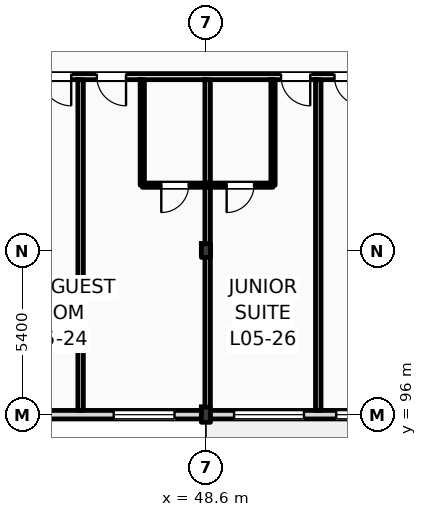
"""IFC4 building model, lengths in metres.
Left out: names, types, materials, properties, quantities, classifications, styles, units other than length and angle.
Written with IfcOpenShell. Run it as: python <this file> out.ifc"""

import sys

from ifc_helpers import new_model, si_unit, direction, frame, frame_2d, origin, origin_2d, place, context, subcontext, project, spatial, rectangle, i_section, extrude, element, fill, save


model = new_model("IFC4")
c1 = context("Model", 3, precision=1e-05, world=origin(), true_north=direction((0.0, 1.0)))
c2 = subcontext(c1, "Body", "Model", "MODEL_VIEW")
j1 = project(units=[si_unit("LENGTHUNIT", "METRE"), si_unit("PLANEANGLEUNIT", "RADIAN")], contexts=[c1])
p1 = place(None, origin())
s1 = spatial("IfcSite", under=j1, at=p1, CompositionType="ELEMENT")
p2 = place(p1, origin())
s2 = spatial("IfcBuilding", under=s1, at=p2, CompositionType="ELEMENT")
p3 = place(p2, frame((0.0, 0.0, 24.6)))
s3 = spatial("IfcBuildingStorey", under=s2, at=p3, CompositionType="ELEMENT", Elevation=24.6)
p4 = place(p3, frame((48.6, 96.0, 0.0), z_axis=(0.0, 0.0, 1.0), x_axis=(1.0, 0.0, 0.0)))
e1 = element("IfcColumn", 1, at=p4, inside=s3, PredefinedType="COLUMN", context=c2, shape_type="SweptSolid", body=[
    extrude(i_section(OverallWidth=0.3, OverallDepth=0.5, WebThickness=0.014, FlangeThickness=0.028, FilletRadius=0.027, at=origin_2d()), origin(), (0.0, 0.0, 1.0), 3.6),
])
p5 = place(p3, frame((48.6, 101.4, 0.0), z_axis=(0.0, 0.0, 1.0), x_axis=(1.0, 0.0, 0.0)))
e2 = element("IfcColumn", 2, at=p5, inside=s3, PredefinedType="COLUMN", context=c2, shape_type="SweptSolid", body=[
    extrude(i_section(OverallWidth=0.3, OverallDepth=0.45, WebThickness=0.014, FlangeThickness=0.026, FilletRadius=0.027, at=origin_2d()), origin(), (0.0, 0.0, 1.0), 3.6),
])
p6 = place(p3, frame((25.2, 96.0, 0.0), z_axis=(0.0, 0.0, 1.0), x_axis=(1.0, 0.0, 0.0)))
e3 = element("IfcWall", 3, at=p6, inside=s3, PredefinedType="STANDARD", context=c2, shape_type="SweptSolid", body=[
    extrude(rectangle(XDim=94.8, YDim=0.28, at=frame_2d((47.4, 0.0))), origin(), (0.0, 0.0, 1.0), 2.78),
])
p7 = place(p6, frame((16.539, 0.0, 0.9)))
e4 = element("IfcOpeningElement", 4, at=p7, cuts=e3, PredefinedType="OPENING", context=c2, shape_type="SweptSolid", body=[
    extrude(rectangle(XDim=1.75, YDim=1.7, at=frame_2d((0.875, 0.85))), frame((0.0, 0.15, 0.0), z_axis=(0.0, -1.0, 0.0), x_axis=(1.0, 0.0, 0.0)), (0.0, 0.0, 1.0), 0.3),
])
p8 = place(p6, frame((20.367, 0.0, 0.9)))
e5 = element("IfcOpeningElement", 5, at=p8, cuts=e3, PredefinedType="OPENING", context=c2, shape_type="SweptSolid", body=[
    extrude(rectangle(XDim=2.0, YDim=1.7, at=frame_2d((1.0, 0.85))), frame((0.0, 0.15, 0.0), z_axis=(0.0, -1.0, 0.0), x_axis=(1.0, 0.0, 0.0)), (0.0, 0.0, 1.0), 0.3),
])
p9 = place(p6, frame((24.326, 0.0, 0.9)))
e6 = element("IfcOpeningElement", 6, at=p9, cuts=e3, PredefinedType="OPENING", context=c2, shape_type="SweptSolid", body=[
    extrude(rectangle(XDim=2.3, YDim=1.7, at=frame_2d((1.15, 0.85))), frame((0.0, 0.15, 0.0), z_axis=(0.0, -1.0, 0.0), x_axis=(1.0, 0.0, 0.0)), (0.0, 0.0, 1.0), 0.3),
])
p10 = place(p6, frame((27.684, 0.0, 0.9)))
e7 = element("IfcOpeningElement", 7, at=p10, cuts=e3, PredefinedType="OPENING", context=c2, shape_type="SweptSolid", body=[
    extrude(rectangle(XDim=2.6, YDim=1.7, at=frame_2d((1.3, 0.85))), frame((0.0, 0.15, 0.0), z_axis=(0.0, -1.0, 0.0), x_axis=(1.0, 0.0, 0.0)), (0.0, 0.0, 1.0), 0.3),
])
p11 = place(p6, frame((32.083, 0.0, 0.9)))
e8 = element("IfcOpeningElement", 8, at=p11, cuts=e3, PredefinedType="OPENING", context=c2, shape_type="SweptSolid", body=[
    extrude(rectangle(XDim=2.419, YDim=1.7, at=frame_2d((1.209, 0.85))), frame((0.0, 0.15, 0.0), z_axis=(0.0, -1.0, 0.0), x_axis=(1.0, 0.0, 0.0)), (0.0, 0.0, 1.0), 0.3),
])
p12 = place(p6, frame((35.322, 0.0, 0.9)))
e9 = element("IfcOpeningElement", 9, at=p12, cuts=e3, PredefinedType="OPENING", context=c2, shape_type="SweptSolid", body=[
    extrude(rectangle(XDim=2.868, YDim=1.7, at=frame_2d((1.434, 0.85))), frame((0.0, 0.15, 0.0), z_axis=(0.0, -1.0, 0.0), x_axis=(1.0, 0.0, 0.0)), (0.0, 0.0, 1.0), 0.3),
])
p13 = place(p6, frame((56.015, 0.0, 0.9)))
e10 = element("IfcOpeningElement", 10, at=p13, cuts=e3, PredefinedType="OPENING", context=c2, shape_type="SweptSolid", body=[
    extrude(rectangle(XDim=1.2, YDim=1.7, at=frame_2d((0.6, 0.85))), frame((0.0, 0.15, 0.0), z_axis=(0.0, -1.0, 0.0), x_axis=(1.0, 0.0, 0.0)), (0.0, 0.0, 1.0), 0.3),
])
p14 = place(p6, frame((59.888, 0.0, 0.9)))
e11 = element("IfcOpeningElement", 11, at=p14, cuts=e3, PredefinedType="OPENING", context=c2, shape_type="SweptSolid", body=[
    extrude(rectangle(XDim=1.35, YDim=1.7, at=frame_2d((0.675, 0.85))), frame((0.0, 0.15, 0.0), z_axis=(0.0, -1.0, 0.0), x_axis=(1.0, 0.0, 0.0)), (0.0, 0.0, 1.0), 0.3),
])
p15 = place(p6, frame((63.799, 0.0, 0.9)))
e12 = element("IfcOpeningElement", 12, at=p15, cuts=e3, PredefinedType="OPENING", context=c2, shape_type="SweptSolid", body=[
    extrude(rectangle(XDim=1.5, YDim=1.7, at=frame_2d((0.75, 0.85))), frame((0.0, 0.15, 0.0), z_axis=(0.0, -1.0, 0.0), x_axis=(1.0, 0.0, 0.0)), (0.0, 0.0, 1.0), 0.3),
])
p16 = place(p6, frame((67.709, 0.0, 0.9)))
e13 = element("IfcOpeningElement", 13, at=p16, cuts=e3, PredefinedType="OPENING", context=c2, shape_type="SweptSolid", body=[
    extrude(rectangle(XDim=1.65, YDim=1.7, at=frame_2d((0.825, 0.85))), frame((0.0, 0.15, 0.0), z_axis=(0.0, -1.0, 0.0), x_axis=(1.0, 0.0, 0.0)), (0.0, 0.0, 1.0), 0.3),
])
p17 = place(p6, frame((71.618, 0.0, 0.9)))
e14 = element("IfcOpeningElement", 14, at=p17, cuts=e3, PredefinedType="OPENING", context=c2, shape_type="SweptSolid", body=[
    extrude(rectangle(XDim=1.8, YDim=1.7, at=frame_2d((0.9, 0.85))), frame((0.0, 0.15, 0.0), z_axis=(0.0, -1.0, 0.0), x_axis=(1.0, 0.0, 0.0)), (0.0, 0.0, 1.0), 0.3),
])
p18 = place(p6, frame((75.129, 0.0, 0.9)))
e15 = element("IfcOpeningElement", 15, at=p18, cuts=e3, PredefinedType="OPENING", context=c2, shape_type="SweptSolid", body=[
    extrude(rectangle(XDim=1.95, YDim=1.7, at=frame_2d((0.975, 0.85))), frame((0.0, 0.15, 0.0), z_axis=(0.0, -1.0, 0.0), x_axis=(1.0, 0.0, 0.0)), (0.0, 0.0, 1.0), 0.3),
])
p19 = place(p6, frame((79.439, 0.0, 0.9)))
e16 = element("IfcOpeningElement", 16, at=p19, cuts=e3, PredefinedType="OPENING", context=c2, shape_type="SweptSolid", body=[
    extrude(rectangle(XDim=2.1, YDim=1.7, at=frame_2d((1.05, 0.85))), frame((0.0, 0.15, 0.0), z_axis=(0.0, -1.0, 0.0), x_axis=(1.0, 0.0, 0.0)), (0.0, 0.0, 1.0), 0.3),
])
p20 = place(p6, frame((83.349, 0.0, 0.9)))
e17 = element("IfcOpeningElement", 17, at=p20, cuts=e3, PredefinedType="OPENING", context=c2, shape_type="SweptSolid", body=[
    extrude(rectangle(XDim=2.25, YDim=1.7, at=frame_2d((1.125, 0.85))), frame((0.0, 0.15, 0.0), z_axis=(0.0, -1.0, 0.0), x_axis=(1.0, 0.0, 0.0)), (0.0, 0.0, 1.0), 0.3),
])
p21 = place(p6, frame((87.258, 0.0, 0.9)))
e18 = element("IfcOpeningElement", 18, at=p21, cuts=e3, PredefinedType="OPENING", context=c2, shape_type="SweptSolid", body=[
    extrude(rectangle(XDim=2.4, YDim=1.7, at=frame_2d((1.2, 0.85))), frame((0.0, 0.15, 0.0), z_axis=(0.0, -1.0, 0.0), x_axis=(1.0, 0.0, 0.0)), (0.0, 0.0, 1.0), 0.3),
])
p22 = place(p6, frame((91.204, 0.0, 0.9)))
e19 = element("IfcOpeningElement", 19, at=p22, cuts=e3, PredefinedType="OPENING", context=c2, shape_type="SweptSolid", body=[
    extrude(rectangle(XDim=2.55, YDim=1.7, at=frame_2d((1.275, 0.85))), frame((0.0, 0.15, 0.0), z_axis=(0.0, -1.0, 0.0), x_axis=(1.0, 0.0, 0.0)), (0.0, 0.0, 1.0), 0.3),
])
p23 = place(p3, frame((40.76, 107.12, 0.0), z_axis=(0.0, 0.0, 1.0), x_axis=(1.0, 0.0, 0.0)))
e20 = element("IfcWall", 20, at=p23, inside=s3, PredefinedType="PARTITIONING", context=c2, shape_type="SweptSolid", body=[
    extrude(rectangle(XDim=23.44, YDim=0.2, at=frame_2d((11.72, 0.0))), origin(), (0.0, 0.0, 1.0), 3.34),
])
p24 = place(p23, frame((2.449, 0.0, 0.0)))
e21 = element("IfcOpeningElement", 21, at=p24, cuts=e20, PredefinedType="OPENING", context=c2, shape_type="SweptSolid", body=[
    extrude(rectangle(XDim=0.96, YDim=2.2, at=frame_2d((0.48, 1.1))), frame((0.0, 0.11, 0.0), z_axis=(0.0, -1.0, 0.0), x_axis=(1.0, 0.0, 0.0)), (0.0, 0.0, 1.0), 0.22),
])
p25 = place(p23, frame((4.253, 0.0, 0.0)))
e22 = element("IfcOpeningElement", 22, at=p25, cuts=e20, PredefinedType="OPENING", context=c2, shape_type="SweptSolid", body=[
    extrude(rectangle(XDim=0.96, YDim=2.2, at=frame_2d((0.48, 1.1))), frame((0.0, 0.11, 0.0), z_axis=(0.0, -1.0, 0.0), x_axis=(1.0, 0.0, 0.0)), (0.0, 0.0, 1.0), 0.22),
])
p26 = place(p23, frame((10.311, 0.0, 0.0)))
e23 = element("IfcOpeningElement", 23, at=p26, cuts=e20, PredefinedType="OPENING", context=c2, shape_type="SweptSolid", body=[
    extrude(rectangle(XDim=0.96, YDim=2.2, at=frame_2d((0.48, 1.1))), frame((0.0, 0.11, 0.0), z_axis=(0.0, -1.0, 0.0), x_axis=(1.0, 0.0, 0.0)), (0.0, 0.0, 1.0), 0.22),
])
p27 = place(p23, frame((12.069, 0.0, 0.0)))
e24 = element("IfcOpeningElement", 24, at=p27, cuts=e20, PredefinedType="OPENING", context=c2, shape_type="SweptSolid", body=[
    extrude(rectangle(XDim=0.96, YDim=2.2, at=frame_2d((0.48, 1.1))), frame((0.0, 0.11, 0.0), z_axis=(0.0, -1.0, 0.0), x_axis=(1.0, 0.0, 0.0)), (0.0, 0.0, 1.0), 0.22),
])
p28 = place(p23, frame((18.128, 0.0, 0.0)))
e25 = element("IfcOpeningElement", 25, at=p28, cuts=e20, PredefinedType="OPENING", context=c2, shape_type="SweptSolid", body=[
    extrude(rectangle(XDim=0.96, YDim=2.2, at=frame_2d((0.48, 1.1))), frame((0.0, 0.11, 0.0), z_axis=(0.0, -1.0, 0.0), x_axis=(1.0, 0.0, 0.0)), (0.0, 0.0, 1.0), 0.22),
])
p29 = place(p23, frame((19.841, 0.0, 0.0)))
e26 = element("IfcOpeningElement", 26, at=p29, cuts=e20, PredefinedType="OPENING", context=c2, shape_type="SweptSolid", body=[
    extrude(rectangle(XDim=0.96, YDim=2.2, at=frame_2d((0.48, 1.1))), frame((0.0, 0.11, 0.0), z_axis=(0.0, -1.0, 0.0), x_axis=(1.0, 0.0, 0.0)), (0.0, 0.0, 1.0), 0.22),
])
p30 = place(p3, frame((44.478, 96.14, 0.0), z_axis=(0.0, 0.0, 1.0), x_axis=(0.0, 1.0, 0.0)))
e27 = element("IfcWall", 27, at=p30, inside=s3, PredefinedType="PARTITIONING", context=c2, shape_type="SweptSolid", body=[
    extrude(rectangle(XDim=10.88, YDim=0.18, at=frame_2d((5.44, 0.0))), origin(), (0.0, 0.0, 1.0), 3.34),
])
p31 = place(p3, frame((48.657, 96.14, 0.0), z_axis=(0.0, 0.0, 1.0), x_axis=(0.0, 1.0, 0.0)))
e28 = element("IfcWall", 28, at=p31, inside=s3, PredefinedType="PARTITIONING", context=c2, shape_type="SweptSolid", body=[
    extrude(rectangle(XDim=10.88, YDim=0.18, at=frame_2d((5.44, 0.0))), origin(), (0.0, 0.0, 1.0), 2.93),
])
p32 = place(p3, frame((46.507, 103.55, 0.0), z_axis=(0.0, 0.0, 1.0), x_axis=(0.0, 1.0, 0.0)))
e29 = element("IfcWall", 29, at=p32, inside=s3, PredefinedType="PARTITIONING", context=c2, shape_type="SweptSolid", body=[
    extrude(rectangle(XDim=3.47, YDim=0.14, at=frame_2d((1.735, 0.0))), origin(), (0.0, 0.0, 1.0), 3.34),
])
p33 = place(p3, frame((46.507, 103.55, 0.0), z_axis=(0.0, 0.0, 1.0), x_axis=(1.0, 0.0, 0.0)))
e30 = element("IfcWall", 30, at=p33, inside=s3, PredefinedType="PARTITIONING", context=c2, shape_type="SweptSolid", body=[
    extrude(rectangle(XDim=2.15, YDim=0.14, at=frame_2d((1.075, 0.0))), origin(), (0.0, 0.0, 1.0), 3.34),
])
p34 = place(p33, frame((0.625, 0.0, 0.0)))
e31 = element("IfcOpeningElement", 31, at=p34, cuts=e30, PredefinedType="OPENING", context=c2, shape_type="SweptSolid", body=[
    extrude(rectangle(XDim=0.9, YDim=2.1, at=frame_2d((0.45, 1.05))), frame((0.0, 0.08, 0.0), z_axis=(0.0, -1.0, 0.0), x_axis=(1.0, 0.0, 0.0)), (0.0, 0.0, 1.0), 0.16),
])
p35 = place(p3, frame((52.295, 96.14, 0.0), z_axis=(0.0, 0.0, 1.0), x_axis=(0.0, 1.0, 0.0)))
e32 = element("IfcWall", 32, at=p35, inside=s3, PredefinedType="PARTITIONING", context=c2, shape_type="SweptSolid", body=[
    extrude(rectangle(XDim=10.88, YDim=0.18, at=frame_2d((5.44, 0.0))), origin(), (0.0, 0.0, 1.0), 3.34),
])
p36 = place(p3, frame((50.807, 103.55, 0.0), z_axis=(0.0, 0.0, 1.0), x_axis=(0.0, 1.0, 0.0)))
e33 = element("IfcWall", 33, at=p36, inside=s3, PredefinedType="PARTITIONING", context=c2, shape_type="SweptSolid", body=[
    extrude(rectangle(XDim=3.47, YDim=0.14, at=frame_2d((1.735, 0.0))), origin(), (0.0, 0.0, 1.0), 3.34),
])
p37 = place(p3, frame((48.657, 103.55, 0.0), z_axis=(0.0, 0.0, 1.0), x_axis=(1.0, 0.0, 0.0)))
e34 = element("IfcWall", 34, at=p37, inside=s3, PredefinedType="PARTITIONING", context=c2, shape_type="SweptSolid", body=[
    extrude(rectangle(XDim=2.15, YDim=0.14, at=frame_2d((1.075, 0.0))), origin(), (0.0, 0.0, 1.0), 3.34),
])
p38 = place(p37, frame((0.625, 0.0, 0.0)))
e35 = element("IfcOpeningElement", 35, at=p38, cuts=e34, PredefinedType="OPENING", context=c2, shape_type="SweptSolid", body=[
    extrude(rectangle(XDim=0.9, YDim=2.1, at=frame_2d((0.45, 1.05))), frame((0.0, 0.08, 0.0), z_axis=(0.0, -1.0, 0.0), x_axis=(1.0, 0.0, 0.0)), (0.0, 0.0, 1.0), 0.16),
])
p39 = place(p8, origin())
e36 = element("IfcWindow", 36, at=p39, inside=s3, PartitioningType="DOUBLE_PANEL_VERTICAL", PredefinedType="WINDOW", context=c2, shape_type="SweptSolid", body=[
    extrude(rectangle(XDim=2.0, YDim=1.7, at=frame_2d((1.0, 0.85))), frame((0.0, 0.03, 0.0), z_axis=(0.0, -1.0, 0.0), x_axis=(1.0, 0.0, 0.0)), (0.0, 0.0, 1.0), 0.06),
])
fill(e5, e36)
p40 = place(p9, origin())
e37 = element("IfcWindow", 37, at=p40, inside=s3, PartitioningType="DOUBLE_PANEL_VERTICAL", PredefinedType="WINDOW", context=c2, shape_type="SweptSolid", body=[
    extrude(rectangle(XDim=2.3, YDim=1.7, at=frame_2d((1.15, 0.85))), frame((0.0, 0.03, 0.0), z_axis=(0.0, -1.0, 0.0), x_axis=(1.0, 0.0, 0.0)), (0.0, 0.0, 1.0), 0.06),
])
fill(e6, e37)
p41 = place(p10, origin())
e38 = element("IfcWindow", 38, at=p41, inside=s3, PartitioningType="DOUBLE_PANEL_VERTICAL", PredefinedType="WINDOW", context=c2, shape_type="SweptSolid", body=[
    extrude(rectangle(XDim=2.6, YDim=1.7, at=frame_2d((1.3, 0.85))), frame((0.0, 0.03, 0.0), z_axis=(0.0, -1.0, 0.0), x_axis=(1.0, 0.0, 0.0)), (0.0, 0.0, 1.0), 0.06),
])
fill(e7, e38)
p42 = place(p24, frame((0.96, 0.0, 0.0), z_axis=(0.0, 0.0, 1.0), x_axis=(-1.0, 0.0, 0.0)))
e39 = element("IfcDoor", 39, at=p42, inside=s3, OperationType="SINGLE_SWING_RIGHT", PredefinedType="DOOR", context=c2, shape_type="SweptSolid", body=[
    extrude(rectangle(XDim=0.96, YDim=2.2, at=frame_2d((0.48, 1.1))), frame((0.0, 0.025, 0.0), z_axis=(0.0, -1.0, 0.0), x_axis=(1.0, 0.0, 0.0)), (0.0, 0.0, 1.0), 0.05),
])
fill(e21, e39)
p43 = place(p25, frame((0.96, 0.0, 0.0), z_axis=(0.0, 0.0, 1.0), x_axis=(-1.0, 0.0, 0.0)))
e40 = element("IfcDoor", 40, at=p43, inside=s3, OperationType="SINGLE_SWING_RIGHT", PredefinedType="DOOR", context=c2, shape_type="SweptSolid", body=[
    extrude(rectangle(XDim=0.96, YDim=2.2, at=frame_2d((0.48, 1.1))), frame((0.0, 0.025, 0.0), z_axis=(0.0, -1.0, 0.0), x_axis=(1.0, 0.0, 0.0)), (0.0, 0.0, 1.0), 0.05),
])
fill(e22, e40)
p44 = place(p34, frame((0.9, 0.0, 0.0), z_axis=(0.0, 0.0, 1.0), x_axis=(-1.0, 0.0, 0.0)))
e41 = element("IfcDoor", 41, at=p44, inside=s3, OperationType="SINGLE_SWING_LEFT", PredefinedType="DOOR", context=c2, shape_type="SweptSolid", body=[
    extrude(rectangle(XDim=0.9, YDim=2.1, at=frame_2d((0.45, 1.05))), frame((0.0, 0.025, 0.0), z_axis=(0.0, -1.0, 0.0), x_axis=(1.0, 0.0, 0.0)), (0.0, 0.0, 1.0), 0.05),
])
fill(e31, e41)
p45 = place(p26, frame((0.96, 0.0, 0.0), z_axis=(0.0, 0.0, 1.0), x_axis=(-1.0, 0.0, 0.0)))
e42 = element("IfcDoor", 42, at=p45, inside=s3, OperationType="SINGLE_SWING_RIGHT", PredefinedType="DOOR", context=c2, shape_type="SweptSolid", body=[
    extrude(rectangle(XDim=0.96, YDim=2.2, at=frame_2d((0.48, 1.1))), frame((0.0, 0.025, 0.0), z_axis=(0.0, -1.0, 0.0), x_axis=(1.0, 0.0, 0.0)), (0.0, 0.0, 1.0), 0.05),
])
fill(e23, e42)
p46 = place(p38, frame((0.9, 0.0, 0.0), z_axis=(0.0, 0.0, 1.0), x_axis=(-1.0, 0.0, 0.0)))
e43 = element("IfcDoor", 43, at=p46, inside=s3, OperationType="SINGLE_SWING_LEFT", PredefinedType="DOOR", context=c2, shape_type="SweptSolid", body=[
    extrude(rectangle(XDim=0.9, YDim=2.1, at=frame_2d((0.45, 1.05))), frame((0.0, 0.025, 0.0), z_axis=(0.0, -1.0, 0.0), x_axis=(1.0, 0.0, 0.0)), (0.0, 0.0, 1.0), 0.05),
])
fill(e35, e43)
p47 = place(p27, frame((0.96, 0.0, 0.0), z_axis=(0.0, 0.0, 1.0), x_axis=(-1.0, 0.0, 0.0)))
e44 = element("IfcDoor", 44, at=p47, inside=s3, OperationType="SINGLE_SWING_RIGHT", PredefinedType="DOOR", context=c2, shape_type="SweptSolid", body=[
    extrude(rectangle(XDim=0.96, YDim=2.2, at=frame_2d((0.48, 1.1))), frame((0.0, 0.025, 0.0), z_axis=(0.0, -1.0, 0.0), x_axis=(1.0, 0.0, 0.0)), (0.0, 0.0, 1.0), 0.05),
])
fill(e24, e44)
save(model, sys.argv[1])
